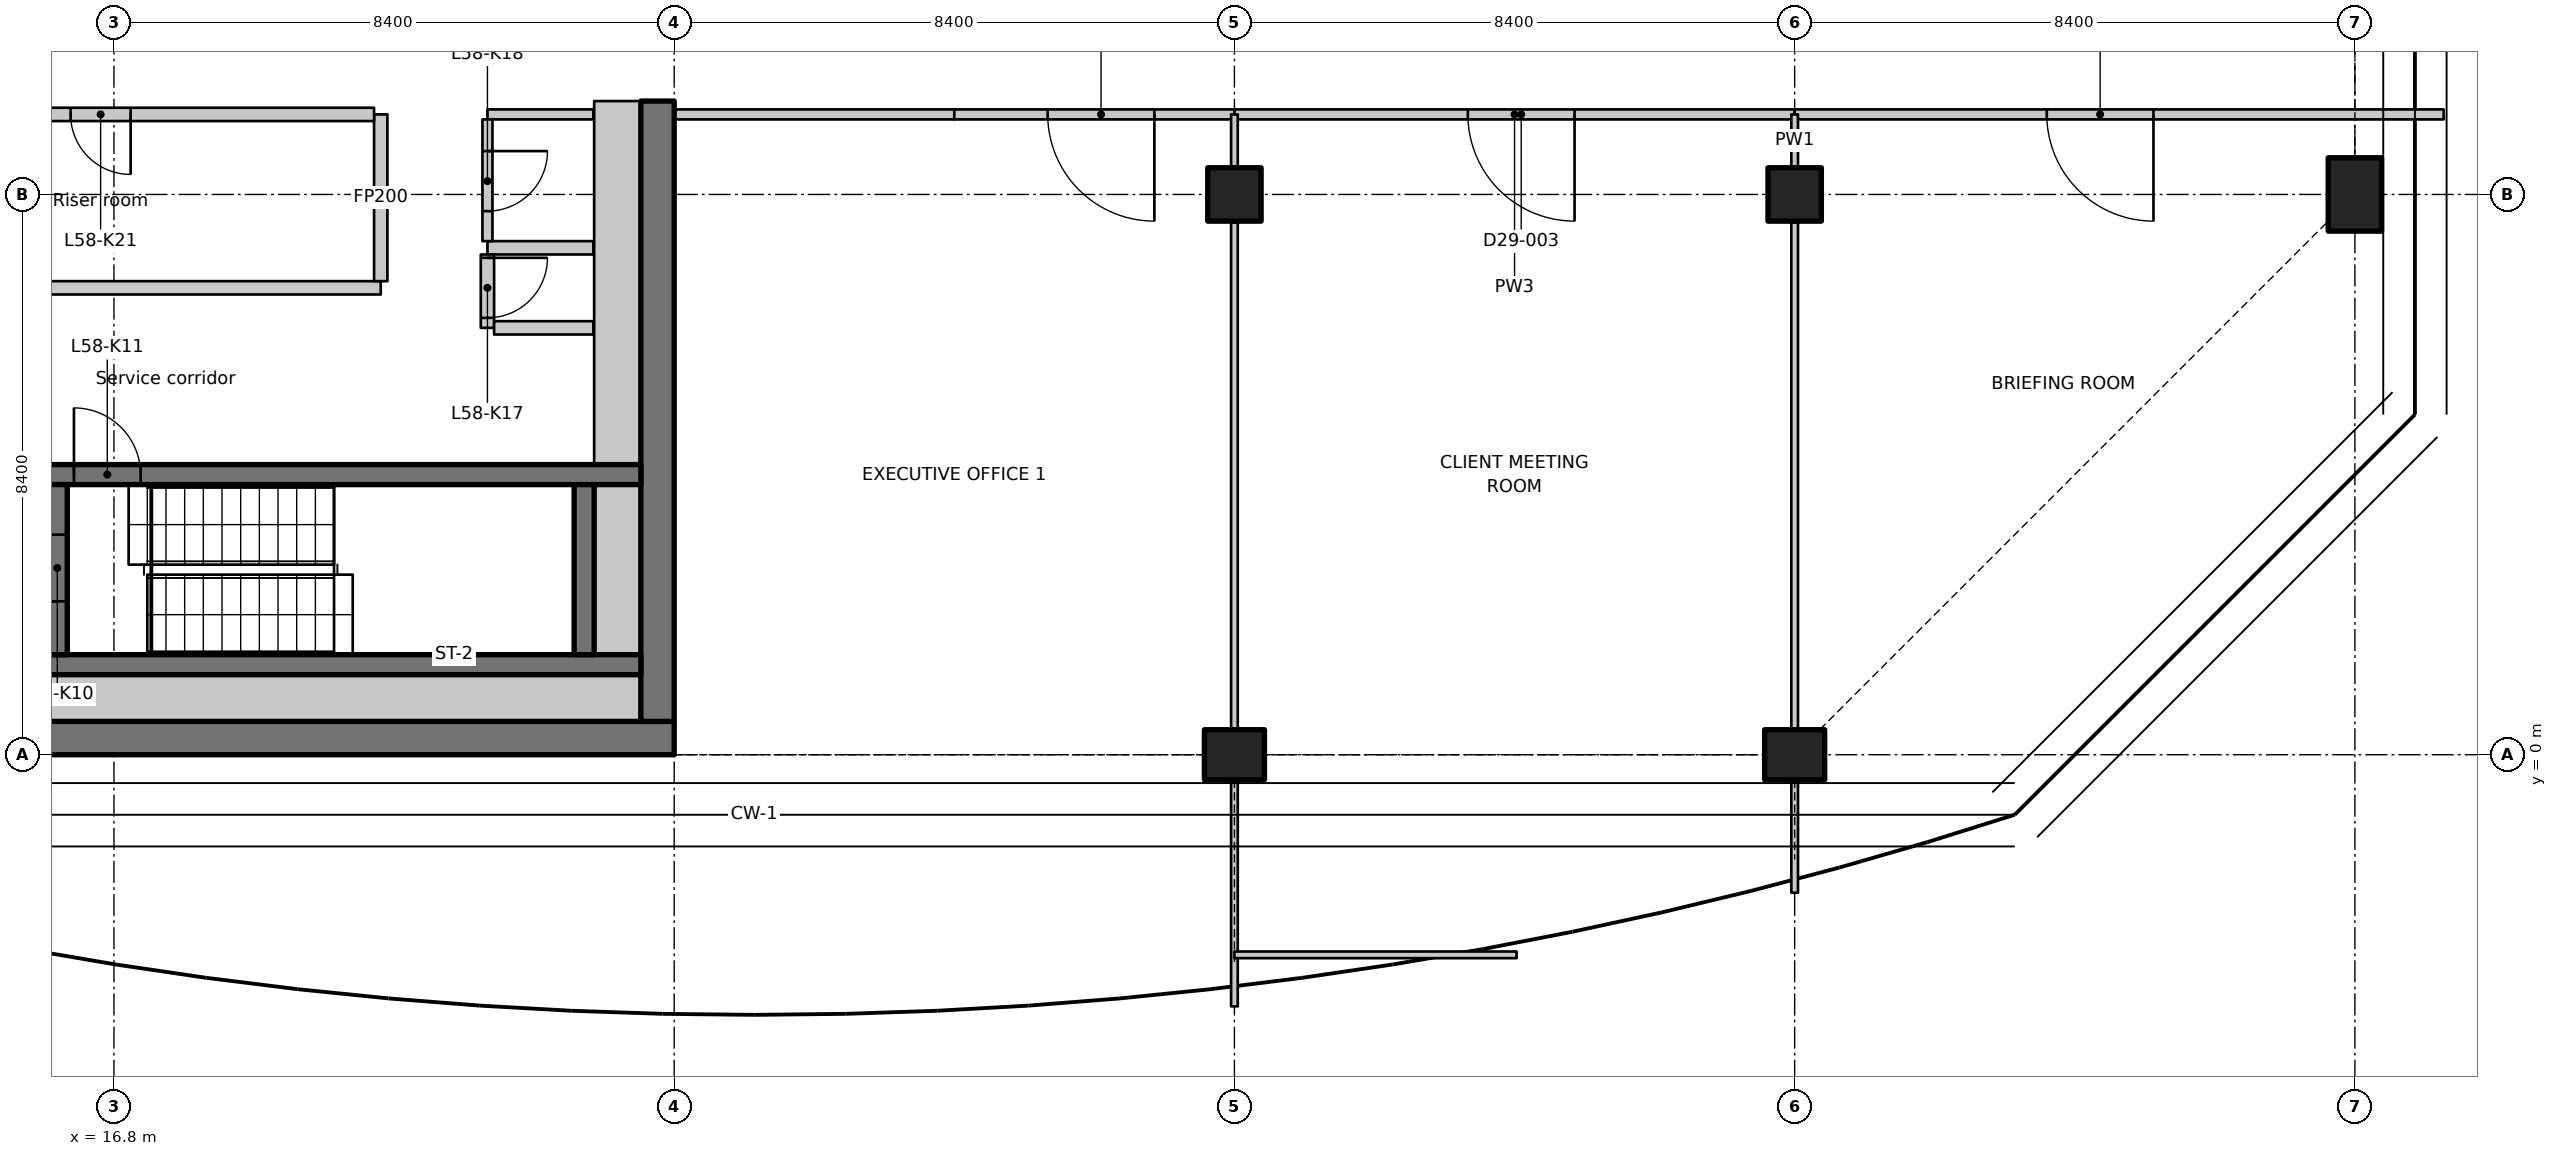
"""IFC4 building model, lengths in metres.
Left out: names, types, materials, properties, quantities, classifications, styles, units other than length and angle.
Written with IfcOpenShell. Run it as: python <this file> out.ifc"""

import sys

from ifc_helpers import new_model, si_unit, direction, frame, frame_2d, origin, origin_2d, place, context, subcontext, project, spatial, polyline, rectangle, outline, extrude, element, fill, save


model = new_model("IFC4")
c1 = context("Model", 3, precision=1e-05, world=origin(), true_north=direction((0.0, 1.0)))
c2 = subcontext(c1, "Body", "Model", "MODEL_VIEW")
j1 = project(units=[si_unit("LENGTHUNIT", "METRE"), si_unit("PLANEANGLEUNIT", "RADIAN")], contexts=[c1])
p1 = place(None, origin())
s1 = spatial("IfcSite", under=j1, at=p1, CompositionType="ELEMENT")
p2 = place(p1, origin())
s2 = spatial("IfcBuilding", under=s1, at=p2, CompositionType="ELEMENT")
p3 = place(p2, frame((0.0, 0.0, 230.1)))
s3 = spatial("IfcBuildingStorey", under=s2, at=p3, CompositionType="ELEMENT", Elevation=230.1)
p4 = place(p3, frame((33.6, 0.0, 0.0), z_axis=(0.0, 0.0, 1.0), x_axis=(0.0, 1.0, 0.0)))
e1 = element("IfcColumn", 1, at=p4, inside=s3, PredefinedType="COLUMN", context=c2, shape_type="SweptSolid", body=[
    extrude(rectangle(XDim=0.75, YDim=0.9, at=origin_2d()), origin(), (0.0, 0.0, 1.0), 3.35),
])
p5 = place(p3, frame((33.6, 8.4, 0.0), z_axis=(0.0, 0.0, 1.0), x_axis=(1.0, 0.0, 0.0)))
e2 = element("IfcColumn", 2, at=p5, inside=s3, PredefinedType="COLUMN", context=c2, shape_type="SweptSolid", body=[
    extrude(rectangle(XDim=0.8, YDim=0.8, at=origin_2d()), origin(), (0.0, 0.0, 1.0), 3.35),
])
p6 = place(p3, frame((42.0, 0.0, 0.0), z_axis=(0.0, 0.0, 1.0), x_axis=(0.0, 1.0, 0.0)))
e3 = element("IfcColumn", 3, at=p6, inside=s3, PredefinedType="COLUMN", context=c2, shape_type="SweptSolid", body=[
    extrude(rectangle(XDim=0.75, YDim=0.9, at=origin_2d()), origin(), (0.0, 0.0, 1.0), 3.35),
])
p7 = place(p3, frame((42.0, 8.4, 0.0), z_axis=(0.0, 0.0, 1.0), x_axis=(1.0, 0.0, 0.0)))
e4 = element("IfcColumn", 4, at=p7, inside=s3, PredefinedType="COLUMN", context=c2, shape_type="SweptSolid", body=[
    extrude(rectangle(XDim=0.8, YDim=0.8, at=origin_2d()), origin(), (0.0, 0.0, 1.0), 3.35),
])
p8 = place(p3, frame((50.4, 8.4, 0.0), z_axis=(0.0, 0.0, 1.0), x_axis=(1.0, 0.0, 0.0)))
e5 = element("IfcColumn", 5, at=p8, inside=s3, PredefinedType="COLUMN", context=c2, shape_type="SweptSolid", body=[
    extrude(rectangle(XDim=0.8, YDim=1.1, at=origin_2d()), origin(), (0.0, 0.0, 1.0), 3.35),
])
p9 = place(p3, frame((7.436, 0.25, 0.0), z_axis=(0.0, 0.0, 1.0), x_axis=(1.0, 0.0, 0.0)))
e6 = element("IfcWall", 6, at=p9, inside=s3, PredefinedType="SHEAR", context=c2, shape_type="SweptSolid", body=[
    extrude(rectangle(XDim=17.764, YDim=0.5, at=frame_2d((8.882, 0.0))), origin(), (0.0, 0.0, 1.0), 3.35),
])
p10 = place(p3, frame((24.95, 0.5, 0.0), z_axis=(0.0, 0.0, 1.0), x_axis=(0.0, 1.0, 0.0)))
e7 = element("IfcWall", 7, at=p10, inside=s3, PredefinedType="SHEAR", context=c2, shape_type="SweptSolid", body=[
    extrude(rectangle(XDim=9.3, YDim=0.5, at=frame_2d((4.65, 0.0))), origin(), (0.0, 0.0, 1.0), 3.35),
])
p11 = place(p3, frame((15.8, 1.35, 0.0), z_axis=(0.0, 0.0, 1.0), x_axis=(1.0, 0.0, 0.0)))
e8 = element("IfcWall", 8, at=p11, inside=s3, PredefinedType="SHEAR", context=c2, shape_type="SweptSolid", body=[
    extrude(rectangle(XDim=8.9, YDim=0.3, at=frame_2d((4.45, 0.0))), origin(), (0.0, 0.0, 1.0), 3.35),
])
p12 = place(p3, frame((15.8, 4.2, 0.0), z_axis=(0.0, 0.0, 1.0), x_axis=(1.0, 0.0, 0.0)))
e9 = element("IfcWall", 9, at=p12, inside=s3, PredefinedType="SHEAR", context=c2, shape_type="SweptSolid", body=[
    extrude(rectangle(XDim=8.9, YDim=0.3, at=frame_2d((4.45, 0.0))), origin(), (0.0, 0.0, 1.0), 3.35),
])
p13 = place(p12, frame((0.4, 0.0, 0.0)))
e10 = element("IfcOpeningElement", 10, at=p13, cuts=e9, PredefinedType="OPENING", context=c2, shape_type="SweptSolid", body=[
    extrude(rectangle(XDim=1.0, YDim=2.1, at=frame_2d((0.5, 1.05))), frame((0.0, 0.16, 0.0), z_axis=(0.0, -1.0, 0.0), x_axis=(1.0, 0.0, 0.0)), (0.0, 0.0, 1.0), 0.32),
])
p14 = place(p3, frame((15.95, 1.5, 0.0), z_axis=(0.0, 0.0, 1.0), x_axis=(0.0, 1.0, 0.0)))
e11 = element("IfcWall", 11, at=p14, inside=s3, PredefinedType="SHEAR", context=c2, shape_type="SweptSolid", body=[
    extrude(rectangle(XDim=2.55, YDim=0.3, at=frame_2d((1.275, 0.0))), origin(), (0.0, 0.0, 1.0), 3.35),
])
p15 = place(p14, frame((0.8, 0.0, 0.0)))
e12 = element("IfcOpeningElement", 12, at=p15, cuts=e11, PredefinedType="OPENING", context=c2, shape_type="SweptSolid", body=[
    extrude(rectangle(XDim=1.0, YDim=2.1, at=frame_2d((0.5, 1.05))), frame((0.0, 0.16, 0.0), z_axis=(0.0, -1.0, 0.0), x_axis=(1.0, 0.0, 0.0)), (0.0, 0.0, 1.0), 0.32),
])
p16 = place(p3, frame((23.85, 1.5, 0.0), z_axis=(0.0, 0.0, 1.0), x_axis=(0.0, 1.0, 0.0)))
e13 = element("IfcWall", 13, at=p16, inside=s3, PredefinedType="SHEAR", context=c2, shape_type="SweptSolid", body=[
    extrude(rectangle(XDim=2.55, YDim=0.3, at=frame_2d((1.275, 0.0))), origin(), (0.0, 0.0, 1.0), 3.35),
])
p17 = place(p3, frame((12.4, 7.0, 0.0), z_axis=(0.0, 0.0, 1.0), x_axis=(1.0, 0.0, 0.0)))
e14 = element("IfcWall", 14, at=p17, inside=s3, PredefinedType="PARTITIONING", context=c2, shape_type="SweptSolid", body=[
    extrude(rectangle(XDim=8.4, YDim=0.2, at=frame_2d((4.2, 0.0))), origin(), (0.0, 0.0, 1.0), 3.35),
])
p18 = place(p3, frame((20.8, 7.1, 0.0), z_axis=(0.0, 0.0, 1.0), x_axis=(0.0, 1.0, 0.0)))
e15 = element("IfcWall", 15, at=p18, inside=s3, PredefinedType="PARTITIONING", context=c2, shape_type="SweptSolid", body=[
    extrude(rectangle(XDim=2.5, YDim=0.2, at=frame_2d((1.25, 0.0))), origin(), (0.0, 0.0, 1.0), 3.35),
])
p19 = place(p3, frame((20.7, 9.6, 0.0), z_axis=(0.0, 0.0, 1.0), x_axis=(-1.0, 0.0, 0.0)))
e16 = element("IfcWall", 16, at=p19, inside=s3, PredefinedType="PARTITIONING", context=c2, shape_type="SweptSolid", body=[
    extrude(rectangle(XDim=8.3, YDim=0.2, at=frame_2d((4.15, 0.0))), origin(), (0.0, 0.0, 1.0), 3.35),
])
p20 = place(p19, frame((3.65, 0.0, 0.0)))
e17 = element("IfcOpeningElement", 17, at=p20, cuts=e16, PredefinedType="OPENING", context=c2, shape_type="SweptSolid", body=[
    extrude(rectangle(XDim=0.9, YDim=2.1, at=frame_2d((0.45, 1.05))), frame((0.0, 0.11, 0.0), z_axis=(0.0, -1.0, 0.0), x_axis=(1.0, 0.0, 0.0)), (0.0, 0.0, 1.0), 0.22),
])
p21 = place(p3, frame((23.988, 7.6, 0.0), z_axis=(0.0, 0.0, 1.0), x_axis=(-1.0, 0.0, 0.0)))
e18 = element("IfcWall", 18, at=p21, inside=s3, PredefinedType="PARTITIONING", context=c2, shape_type="SweptSolid", body=[
    extrude(rectangle(XDim=1.588, YDim=0.2, at=frame_2d((0.794, 0.0))), origin(), (0.0, 0.0, 1.0), 3.35),
])
p22 = place(p3, frame((22.4, 7.5, 0.0), z_axis=(0.0, 0.0, 1.0), x_axis=(0.0, -1.0, 0.0)))
e19 = element("IfcWall", 19, at=p22, inside=s3, PredefinedType="PARTITIONING", context=c2, shape_type="SweptSolid", body=[
    extrude(rectangle(XDim=1.1, YDim=0.2, at=frame_2d((0.55, 0.0))), origin(), (0.0, 0.0, 1.0), 3.35),
])
p23 = place(p22, frame((0.05, 0.0, 0.0)))
e20 = element("IfcOpeningElement", 20, at=p23, cuts=e19, PredefinedType="OPENING", context=c2, shape_type="SweptSolid", body=[
    extrude(rectangle(XDim=0.9, YDim=2.1, at=frame_2d((0.45, 1.05))), frame((0.0, 0.11, 0.0), z_axis=(0.0, -1.0, 0.0), x_axis=(1.0, 0.0, 0.0)), (0.0, 0.0, 1.0), 0.22),
])
p24 = place(p3, frame((22.5, 6.4, 0.0), z_axis=(0.0, 0.0, 1.0), x_axis=(1.0, 0.0, 0.0)))
e21 = element("IfcWall", 21, at=p24, inside=s3, PredefinedType="PARTITIONING", context=c2, shape_type="SweptSolid", body=[
    extrude(rectangle(XDim=1.488, YDim=0.2, at=frame_2d((0.744, 0.0))), origin(), (0.0, 0.0, 1.0), 3.35),
])
p25 = place(p3, frame((23.988, 9.6, 0.0), z_axis=(0.0, 0.0, 1.0), x_axis=(-1.0, 0.0, 0.0)))
e22 = element("IfcWall", 22, at=p25, inside=s3, PredefinedType="PARTITIONING", context=c2, shape_type="SweptSolid", body=[
    extrude(rectangle(XDim=1.588, YDim=0.15, at=frame_2d((0.794, 0.0))), origin(), (0.0, 0.0, 1.0), 3.35),
])
p26 = place(p3, frame((22.4, 9.525, 0.0), z_axis=(0.0, 0.0, 1.0), x_axis=(0.0, -1.0, 0.0)))
e23 = element("IfcWall", 23, at=p26, inside=s3, PredefinedType="PARTITIONING", context=c2, shape_type="SweptSolid", body=[
    extrude(rectangle(XDim=1.825, YDim=0.15, at=frame_2d((0.913, 0.0))), origin(), (0.0, 0.0, 1.0), 3.35),
])
p27 = place(p26, frame((0.475, 0.0, 0.0)))
e24 = element("IfcOpeningElement", 24, at=p27, cuts=e23, PredefinedType="OPENING", context=c2, shape_type="SweptSolid", body=[
    extrude(rectangle(XDim=0.9, YDim=2.1, at=frame_2d((0.45, 1.05))), frame((0.0, 0.085, 0.0), z_axis=(0.0, -1.0, 0.0), x_axis=(1.0, 0.0, 0.0)), (0.0, 0.0, 1.0), 0.17),
])
p28 = place(p3, frame((13.35, 0.85, 0.0), z_axis=(0.0, 0.0, 1.0), x_axis=(1.0, 0.0, 0.0)))
e25 = element("IfcWall", 25, at=p28, inside=s3, PredefinedType="PARTITIONING", context=c2, shape_type="SweptSolid", body=[
    extrude(rectangle(XDim=11.35, YDim=0.7, at=frame_2d((5.675, 0.0))), origin(), (0.0, 0.0, 1.0), 3.35),
])
p29 = place(p3, frame((24.35, 1.5, 0.0), z_axis=(0.0, 0.0, 1.0), x_axis=(0.0, 1.0, 0.0)))
e26 = element("IfcWall", 26, at=p29, inside=s3, PredefinedType="PARTITIONING", context=c2, shape_type="SweptSolid", body=[
    extrude(rectangle(XDim=2.55, YDim=0.7, at=frame_2d((1.275, 0.0))), origin(), (0.0, 0.0, 1.0), 3.35),
])
p30 = place(p3, frame((24.35, 4.35, 0.0), z_axis=(0.0, 0.0, 1.0), x_axis=(0.0, 1.0, 0.0)))
e27 = element("IfcWall", 27, at=p30, inside=s3, PredefinedType="PARTITIONING", context=c2, shape_type="SweptSolid", body=[
    extrude(rectangle(XDim=5.45, YDim=0.7, at=frame_2d((2.725, 0.0))), origin(), (0.0, 0.0, 1.0), 3.35),
])
p31 = place(p3, frame((29.4, 9.6, 0.0), z_axis=(0.0, 0.0, 1.0), x_axis=(-1.0, 0.0, 0.0)))
e28 = element("IfcWall", 28, at=p31, inside=s3, PredefinedType="PARTITIONING", context=c2, shape_type="SweptSolid", body=[
    extrude(rectangle(XDim=4.2, YDim=0.15, at=frame_2d((2.1, 0.0))), origin(), (0.0, 0.0, 1.0), 3.33),
])
p32 = place(p3, frame((33.6, 9.6, 0.0), z_axis=(0.0, 0.0, 1.0), x_axis=(-1.0, 0.0, 0.0)))
e29 = element("IfcWall", 29, at=p32, inside=s3, PredefinedType="PARTITIONING", context=c2, shape_type="SweptSolid", body=[
    extrude(rectangle(XDim=4.2, YDim=0.15, at=frame_2d((2.1, 0.0))), origin(), (0.0, 0.0, 1.0), 3.33),
])
p33 = place(p32, frame((1.2, 0.0, 0.0)))
e30 = element("IfcOpeningElement", 30, at=p33, cuts=e29, PredefinedType="OPENING", context=c2, shape_type="SweptSolid", body=[
    extrude(rectangle(XDim=1.6, YDim=2.1, at=frame_2d((0.8, 1.05))), frame((0.0, 0.085, 0.0), z_axis=(0.0, -1.0, 0.0), x_axis=(1.0, 0.0, 0.0)), (0.0, 0.0, 1.0), 0.17),
])
p34 = place(p3, frame((42.0, 9.6, 0.0), z_axis=(0.0, 0.0, 1.0), x_axis=(-1.0, 0.0, 0.0)))
e31 = element("IfcWall", 31, at=p34, inside=s3, PredefinedType="PARTITIONING", context=c2, shape_type="SweptSolid", body=[
    extrude(rectangle(XDim=8.4, YDim=0.15, at=frame_2d((4.2, 0.0))), origin(), (0.0, 0.0, 1.0), 3.33),
])
p35 = place(p34, frame((3.3, 0.0, 0.0)))
e32 = element("IfcOpeningElement", 32, at=p35, cuts=e31, PredefinedType="OPENING", context=c2, shape_type="SweptSolid", body=[
    extrude(rectangle(XDim=1.6, YDim=2.1, at=frame_2d((0.8, 1.05))), frame((0.0, 0.085, 0.0), z_axis=(0.0, -1.0, 0.0), x_axis=(1.0, 0.0, 0.0)), (0.0, 0.0, 1.0), 0.17),
])
p36 = place(p3, frame((51.73, 9.6, 0.0), z_axis=(0.0, 0.0, 1.0), x_axis=(-1.0, 0.0, 0.0)))
e33 = element("IfcWall", 33, at=p36, inside=s3, PredefinedType="PARTITIONING", context=c2, shape_type="SweptSolid", body=[
    extrude(outline(polyline([(0.0, 0.0), (9.73, 0.0), (9.73, 3.33), (1.781, 3.33), (1.779, 2.98), (0.883, 2.98), (0.881, 3.33), (0.25, 3.33), (0.0, 3.33), (0.0, 0.0)])), frame((0.0, 0.075, 0.0), z_axis=(0.0, -1.0, 0.0), x_axis=(1.0, 0.0, 0.0)), (0.0, 0.0, 1.0), 0.15),
])
p37 = place(p36, frame((4.351, 0.0, 0.0)))
e34 = element("IfcOpeningElement", 34, at=p37, cuts=e33, PredefinedType="OPENING", context=c2, shape_type="SweptSolid", body=[
    extrude(rectangle(XDim=1.6, YDim=2.1, at=frame_2d((0.8, 1.05))), frame((0.0, 0.085, 0.0), z_axis=(0.0, -1.0, 0.0), x_axis=(1.0, 0.0, 0.0)), (0.0, 0.0, 1.0), 0.17),
])
p38 = place(p3, frame((33.6, 9.6, 0.0), z_axis=(0.0, 0.0, 1.0), x_axis=(0.0, -1.0, 0.0)))
e35 = element("IfcWall", 35, at=p38, inside=s3, PredefinedType="PARTITIONING", context=c2, shape_type="SweptSolid", body=[
    extrude(rectangle(XDim=0.78, YDim=0.1, at=frame_2d((0.39, 0.0))), origin(), (0.0, 0.0, 1.0), 3.33),
])
p39 = place(p3, frame((33.6, 7.98, 0.0), z_axis=(0.0, 0.0, 1.0), x_axis=(0.0, -1.0, 0.0)))
e36 = element("IfcWall", 36, at=p39, inside=s3, PredefinedType="PARTITIONING", context=c2, shape_type="SweptSolid", body=[
    extrude(outline(polyline([(0.0, 0.0), (7.585, 0.0), (7.585, 2.98), (7.532, 2.98), (7.53, 3.33), (0.0, 3.33), (0.0, 0.0)])), frame((0.0, 0.05, 0.0), z_axis=(0.0, -1.0, 0.0), x_axis=(1.0, 0.0, 0.0)), (0.0, 0.0, 1.0), 0.1),
])
p40 = place(p3, frame((33.6, -0.395, 0.0), z_axis=(0.0, 0.0, 1.0), x_axis=(0.0, -1.0, 0.0)))
e37 = element("IfcWall", 37, at=p40, inside=s3, PredefinedType="PARTITIONING", context=c2, shape_type="SweptSolid", body=[
    extrude(rectangle(XDim=3.377, YDim=0.1, at=frame_2d((1.688, 0.0))), origin(), (0.0, 0.0, 1.0), 2.98),
])
p41 = place(p3, frame((33.6, -3.0, 0.0), z_axis=(0.0, 0.0, 1.0), x_axis=(1.0, 0.0, 0.0)))
e38 = element("IfcWall", 38, at=p41, inside=s3, PredefinedType="PARTITIONING", context=c2, shape_type="SweptSolid", body=[
    extrude(rectangle(XDim=4.231, YDim=0.1, at=frame_2d((2.115, 0.0))), origin(), (0.0, 0.0, 1.0), 2.98),
])
p42 = place(p3, frame((42.0, 9.6, 0.0), z_axis=(0.0, 0.0, 1.0), x_axis=(0.0, -1.0, 0.0)))
e39 = element("IfcWall", 39, at=p42, inside=s3, PredefinedType="PARTITIONING", context=c2, shape_type="SweptSolid", body=[
    extrude(rectangle(XDim=0.78, YDim=0.1, at=frame_2d((0.39, 0.0))), origin(), (0.0, 0.0, 1.0), 3.33),
])
p43 = place(p3, frame((42.0, 7.98, 0.0), z_axis=(0.0, 0.0, 1.0), x_axis=(0.0, -1.0, 0.0)))
e40 = element("IfcWall", 40, at=p43, inside=s3, PredefinedType="PARTITIONING", context=c2, shape_type="SweptSolid", body=[
    extrude(outline(polyline([(0.0, 0.0), (7.585, 0.0), (7.585, 2.98), (7.316, 2.98), (7.314, 3.33), (0.0, 3.33), (0.0, 0.0)])), frame((0.0, 0.05, 0.0), z_axis=(0.0, -1.0, 0.0), x_axis=(1.0, 0.0, 0.0)), (0.0, 0.0, 1.0), 0.1),
])
p44 = place(p3, frame((42.0, -0.395, 0.0), z_axis=(0.0, 0.0, 1.0), x_axis=(0.0, -1.0, 0.0)))
e41 = element("IfcWall", 41, at=p44, inside=s3, PredefinedType="PARTITIONING", context=c2, shape_type="SweptSolid", body=[
    extrude(rectangle(XDim=1.674, YDim=0.1, at=frame_2d((0.837, 0.0))), origin(), (0.0, 0.0, 1.0), 2.98),
])
p45 = place(p15, origin())
e42 = element("IfcDoor", 42, at=p45, inside=s3, OperationType="SINGLE_SWING_LEFT", PredefinedType="DOOR", context=c2, shape_type="SweptSolid", body=[
    extrude(rectangle(XDim=1.0, YDim=2.1, at=frame_2d((0.5, 1.05))), frame((0.0, 0.025, 0.0), z_axis=(0.0, -1.0, 0.0), x_axis=(1.0, 0.0, 0.0)), (0.0, 0.0, 1.0), 0.05),
])
fill(e12, e42)
p46 = place(p13, origin())
e43 = element("IfcDoor", 43, at=p46, inside=s3, OperationType="SINGLE_SWING_RIGHT", PredefinedType="DOOR", context=c2, shape_type="SweptSolid", body=[
    extrude(rectangle(XDim=1.0, YDim=2.1, at=frame_2d((0.5, 1.05))), frame((0.0, 0.025, 0.0), z_axis=(0.0, -1.0, 0.0), x_axis=(1.0, 0.0, 0.0)), (0.0, 0.0, 1.0), 0.05),
])
fill(e10, e43)
p47 = place(p23, origin())
e44 = element("IfcDoor", 44, at=p47, inside=s3, OperationType="SINGLE_SWING_RIGHT", PredefinedType="DOOR", context=c2, shape_type="SweptSolid", body=[
    extrude(rectangle(XDim=0.9, YDim=2.1, at=frame_2d((0.45, 1.05))), frame((0.0, 0.025, 0.0), z_axis=(0.0, -1.0, 0.0), x_axis=(1.0, 0.0, 0.0)), (0.0, 0.0, 1.0), 0.05),
])
fill(e20, e44)
p48 = place(p27, origin())
e45 = element("IfcDoor", 45, at=p48, inside=s3, OperationType="SINGLE_SWING_LEFT", PredefinedType="DOOR", context=c2, shape_type="SweptSolid", body=[
    extrude(rectangle(XDim=0.9, YDim=2.1, at=frame_2d((0.45, 1.05))), frame((0.0, 0.025, 0.0), z_axis=(0.0, -1.0, 0.0), x_axis=(1.0, 0.0, 0.0)), (0.0, 0.0, 1.0), 0.05),
])
fill(e24, e45)
p49 = place(p20, origin())
e46 = element("IfcDoor", 46, at=p49, inside=s3, OperationType="SINGLE_SWING_RIGHT", PredefinedType="DOOR", context=c2, shape_type="SweptSolid", body=[
    extrude(rectangle(XDim=0.9, YDim=2.1, at=frame_2d((0.45, 1.05))), frame((0.0, 0.025, 0.0), z_axis=(0.0, -1.0, 0.0), x_axis=(1.0, 0.0, 0.0)), (0.0, 0.0, 1.0), 0.05),
])
fill(e17, e46)
p50 = place(p33, origin())
e47 = element("IfcDoor", 47, at=p50, inside=s3, OperationType="DOUBLE_DOOR_SINGLE_SWING", PredefinedType="DOOR", context=c2, shape_type="SweptSolid", body=[
    extrude(rectangle(XDim=1.6, YDim=2.1, at=frame_2d((0.8, 1.05))), frame((0.0, 0.025, 0.0), z_axis=(0.0, -1.0, 0.0), x_axis=(1.0, 0.0, 0.0)), (0.0, 0.0, 1.0), 0.05),
])
fill(e30, e47)
p51 = place(p35, origin())
e48 = element("IfcDoor", 48, at=p51, inside=s3, OperationType="DOUBLE_DOOR_SINGLE_SWING", PredefinedType="DOOR", context=c2, shape_type="SweptSolid", body=[
    extrude(rectangle(XDim=1.6, YDim=2.1, at=frame_2d((0.8, 1.05))), frame((0.0, 0.025, 0.0), z_axis=(0.0, -1.0, 0.0), x_axis=(1.0, 0.0, 0.0)), (0.0, 0.0, 1.0), 0.05),
])
fill(e32, e48)
p52 = place(p37, origin())
e49 = element("IfcDoor", 49, at=p52, inside=s3, OperationType="DOUBLE_DOOR_SINGLE_SWING", PredefinedType="DOOR", context=c2, shape_type="SweptSolid", body=[
    extrude(rectangle(XDim=1.6, YDim=2.1, at=frame_2d((0.8, 1.05))), frame((0.0, 0.025, 0.0), z_axis=(0.0, -1.0, 0.0), x_axis=(1.0, 0.0, 0.0)), (0.0, 0.0, 1.0), 0.05),
])
fill(e34, e49)
save(model, sys.argv[1])
